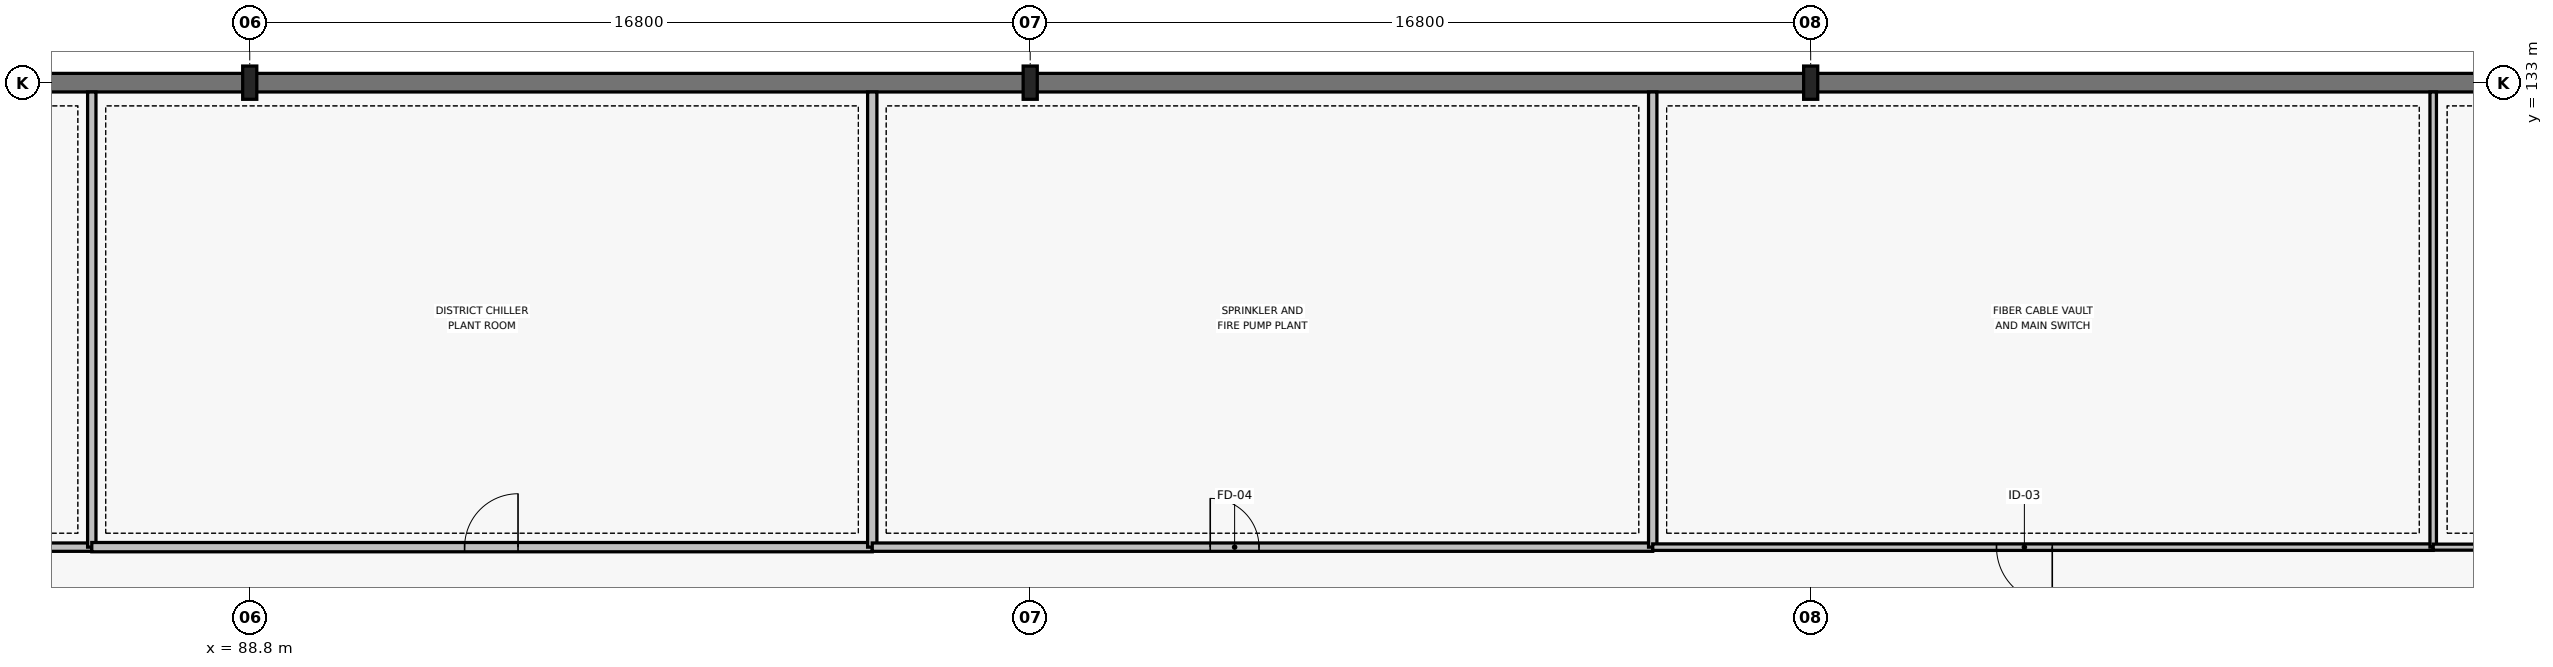
"""IFC4 building model, lengths in metres.
Left out: names, types, materials, properties, quantities, classifications, styles, units other than length and angle.
Written with IfcOpenShell. Run it as: python <this file> out.ifc"""

import sys

from ifc_helpers import new_model, si_unit, direction, frame, frame_2d, origin, origin_2d, place, context, subcontext, project, spatial, rectangle, i_section, extrude, element, fill, save


model = new_model("IFC4")
c1 = context("Model", 3, precision=1e-05, world=origin(), true_north=direction((0.0, 1.0)))
c2 = subcontext(c1, "Body", "Model", "MODEL_VIEW")
j1 = project(units=[si_unit("LENGTHUNIT", "METRE"), si_unit("PLANEANGLEUNIT", "RADIAN")], contexts=[c1])
p1 = place(None, origin())
s1 = spatial("IfcSite", under=j1, at=p1, CompositionType="ELEMENT")
p2 = place(p1, origin())
s2 = spatial("IfcBuilding", under=s1, at=p2, CompositionType="ELEMENT")
p3 = place(p2, frame((0.0, 0.0, -6.0)))
s3 = spatial("IfcBuildingStorey", under=s2, at=p3, CompositionType="ELEMENT", Elevation=-6.0)
for number, where, z_axis, x_axis in (
    (1, (88.8, 133.0, 0.0), (0.0, 0.0, 1.0), (1.0, 0.0, 0.0)),
    (2, (105.6, 133.0, 0.0), (0.0, 0.0, 1.0), (1.0, 0.0, 0.0)),
    (3, (122.4, 133.0, 0.0), (0.0, 0.0, 1.0), (1.0, 0.0, 0.0)),
):
    element("IfcColumn", number, at=place(p3, frame(where, z_axis=z_axis, x_axis=x_axis)), inside=s3, PredefinedType="COLUMN", context=c2, shape_type="SweptSolid", body=[
        extrude(i_section(OverallWidth=0.304, OverallDepth=0.716, WebThickness=0.021, FlangeThickness=0.04, FilletRadius=0.027, at=origin_2d()), origin(), (0.0, 0.0, 1.0), 6.0),
    ])
p4 = place(p3, frame((156.0, 133.0, 0.0), z_axis=(0.0, 0.0, 1.0), x_axis=(-1.0, 0.0, 0.0)))
e4 = element("IfcWall", 4, at=p4, inside=s3, PredefinedType="SOLIDWALL", context=c2, shape_type="SweptSolid", body=[
    extrude(rectangle(XDim=100.8, YDim=0.4, at=frame_2d((50.4, 0.0))), origin(), (0.0, 0.0, 1.0), 6.0),
])
p5 = place(p3, frame((68.8, 123.0, 0.0), z_axis=(0.0, 0.0, 1.0), x_axis=(1.0, 0.0, 0.0)))
e5 = element("IfcWall", 5, at=p5, inside=s3, PredefinedType="PARTITIONING", context=c2, shape_type="SweptSolid", body=[
    extrude(rectangle(XDim=16.6, YDim=0.18, at=frame_2d((8.3, 0.0))), origin(), (0.0, 0.0, 1.0), 5.75),
])
p6 = place(p5, frame((7.4, 0.0, 0.0)))
e6 = element("IfcOpeningElement", 6, at=p6, cuts=e5, PredefinedType="OPENING", context=c2, shape_type="SweptSolid", body=[
    extrude(rectangle(XDim=1.6, YDim=2.25, at=frame_2d((0.8, 1.125))), frame((0.0, 0.1, 0.0), z_axis=(0.0, -1.0, 0.0), x_axis=(1.0, 0.0, 0.0)), (0.0, 0.0, 1.0), 0.2),
])
p7 = place(p3, frame((85.4, 123.0, 0.0), z_axis=(0.0, 0.0, 1.0), x_axis=(0.0, 1.0, 0.0)))
e7 = element("IfcWall", 7, at=p7, inside=s3, PredefinedType="PARTITIONING", context=c2, shape_type="SweptSolid", body=[
    extrude(rectangle(XDim=9.8, YDim=0.18, at=frame_2d((4.9, 0.0))), origin(), (0.0, 0.0, 1.0), 5.75),
])
p8 = place(p3, frame((85.4, 123.0, 0.0), z_axis=(0.0, 0.0, 1.0), x_axis=(1.0, 0.0, 0.0)))
e8 = element("IfcWall", 8, at=p8, inside=s3, PredefinedType="PARTITIONING", context=c2, shape_type="SweptSolid", body=[
    extrude(rectangle(XDim=16.8, YDim=0.2, at=frame_2d((8.4, 0.0))), origin(), (0.0, 0.0, 1.0), 5.75),
])
p9 = place(p8, frame((9.175, 0.0, 0.0), z_axis=(0.0, 0.0, 1.0), x_axis=(-1.0, 0.0, 0.0)))
e9 = element("IfcOpeningElement", 9, at=p9, cuts=e8, PredefinedType="OPENING", context=c2, shape_type="SweptSolid", body=[
    extrude(rectangle(XDim=1.15, YDim=2.2, at=frame_2d((0.575, 1.1))), frame((0.0, 0.11, 0.0), z_axis=(0.0, -1.0, 0.0), x_axis=(1.0, 0.0, 0.0)), (0.0, 0.0, 1.0), 0.22),
])
p10 = place(p3, frame((102.2, 123.0, 0.0), z_axis=(0.0, 0.0, 1.0), x_axis=(0.0, 1.0, 0.0)))
e10 = element("IfcWall", 10, at=p10, inside=s3, PredefinedType="PARTITIONING", context=c2, shape_type="SweptSolid", body=[
    extrude(rectangle(XDim=9.8, YDim=0.2, at=frame_2d((4.9, 0.0))), origin(), (0.0, 0.0, 1.0), 5.75),
])
p11 = place(p3, frame((102.2, 123.0, 0.0), z_axis=(0.0, 0.0, 1.0), x_axis=(1.0, 0.0, 0.0)))
e11 = element("IfcWall", 11, at=p11, inside=s3, PredefinedType="PARTITIONING", context=c2, shape_type="SweptSolid", body=[
    extrude(rectangle(XDim=16.8, YDim=0.18, at=frame_2d((8.4, 0.0))), origin(), (0.0, 0.0, 1.0), 5.75),
])
p12 = place(p11, frame((7.275, 0.0, 0.0)))
e12 = element("IfcOpeningElement", 12, at=p12, cuts=e11, PredefinedType="OPENING", context=c2, shape_type="SweptSolid", body=[
    extrude(rectangle(XDim=1.05, YDim=2.15, at=frame_2d((0.525, 1.075))), frame((0.0, 0.1, 0.0), z_axis=(0.0, -1.0, 0.0), x_axis=(1.0, 0.0, 0.0)), (0.0, 0.0, 1.0), 0.2),
])
p13 = place(p3, frame((119.0, 123.0, 0.0), z_axis=(0.0, 0.0, 1.0), x_axis=(0.0, 1.0, 0.0)))
e13 = element("IfcWall", 13, at=p13, inside=s3, PredefinedType="PARTITIONING", context=c2, shape_type="SweptSolid", body=[
    extrude(rectangle(XDim=9.8, YDim=0.18, at=frame_2d((4.9, 0.0))), origin(), (0.0, 0.0, 1.0), 5.75),
])
p14 = place(p3, frame((119.0, 123.0, 0.0), z_axis=(0.0, 0.0, 1.0), x_axis=(1.0, 0.0, 0.0)))
e14 = element("IfcWall", 14, at=p14, inside=s3, PredefinedType="PARTITIONING", context=c2, shape_type="SweptSolid", body=[
    extrude(rectangle(XDim=16.8, YDim=0.14, at=frame_2d((8.4, 0.0))), origin(), (0.0, 0.0, 1.0), 5.75),
])
p15 = place(p14, frame((7.4, 0.0, 0.0)))
e15 = element("IfcOpeningElement", 15, at=p15, cuts=e14, PredefinedType="OPENING", context=c2, shape_type="SweptSolid", body=[
    extrude(rectangle(XDim=1.2, YDim=2.2, at=frame_2d((0.6, 1.1))), frame((0.0, 0.08, 0.0), z_axis=(0.0, -1.0, 0.0), x_axis=(1.0, 0.0, 0.0)), (0.0, 0.0, 1.0), 0.16),
])
p16 = place(p3, frame((135.8, 123.0, 0.0), z_axis=(0.0, 0.0, 1.0), x_axis=(0.0, 1.0, 0.0)))
e16 = element("IfcWall", 16, at=p16, inside=s3, PredefinedType="PARTITIONING", context=c2, shape_type="SweptSolid", body=[
    extrude(rectangle(XDim=9.8, YDim=0.14, at=frame_2d((4.9, 0.0))), origin(), (0.0, 0.0, 1.0), 5.75),
])
p17 = place(p3, frame((135.8, 123.0, 0.0), z_axis=(0.0, 0.0, 1.0), x_axis=(1.0, 0.0, 0.0)))
e17 = element("IfcWall", 17, at=p17, inside=s3, PredefinedType="PARTITIONING", context=c2, shape_type="SweptSolid", body=[
    extrude(rectangle(XDim=10.2, YDim=0.13, at=frame_2d((5.1, 0.0))), origin(), (0.0, 0.0, 1.0), 5.75),
])
p18 = place(p17, frame((6.95, 0.0, 0.0), z_axis=(0.0, 0.0, 1.0), x_axis=(-1.0, 0.0, 0.0)))
e18 = element("IfcOpeningElement", 18, at=p18, cuts=e17, PredefinedType="OPENING", context=c2, shape_type="SweptSolid", body=[
    extrude(rectangle(XDim=1.1, YDim=2.15, at=frame_2d((0.55, 1.075))), frame((0.0, 0.075, 0.0), z_axis=(0.0, -1.0, 0.0), x_axis=(1.0, 0.0, 0.0)), (0.0, 0.0, 1.0), 0.15),
])
p19 = place(p9, origin())
e19 = element("IfcDoor", 19, at=p19, inside=s3, OperationType="SINGLE_SWING_RIGHT", PredefinedType="DOOR", context=c2, shape_type="SweptSolid", body=[
    extrude(rectangle(XDim=1.15, YDim=2.2, at=frame_2d((0.575, 1.1))), frame((0.0, 0.025, 0.0), z_axis=(0.0, -1.0, 0.0), x_axis=(1.0, 0.0, 0.0)), (0.0, 0.0, 1.0), 0.05),
])
fill(e9, e19)
p20 = place(p12, origin())
e20 = element("IfcDoor", 20, at=p20, inside=s3, OperationType="SINGLE_SWING_LEFT", PredefinedType="DOOR", context=c2, shape_type="SweptSolid", body=[
    extrude(rectangle(XDim=1.05, YDim=2.15, at=frame_2d((0.525, 1.075))), frame((0.0, 0.025, 0.0), z_axis=(0.0, -1.0, 0.0), x_axis=(1.0, 0.0, 0.0)), (0.0, 0.0, 1.0), 0.05),
])
fill(e12, e20)
p21 = place(p15, origin())
e21 = element("IfcDoor", 21, at=p21, inside=s3, OperationType="SINGLE_SWING_RIGHT", PredefinedType="DOOR", context=c2, shape_type="SweptSolid", body=[
    extrude(rectangle(XDim=1.2, YDim=2.2, at=frame_2d((0.6, 1.1))), frame((0.0, 0.025, 0.0), z_axis=(0.0, -1.0, 0.0), x_axis=(1.0, 0.0, 0.0)), (0.0, 0.0, 1.0), 0.05),
])
fill(e15, e21)
save(model, sys.argv[1])
